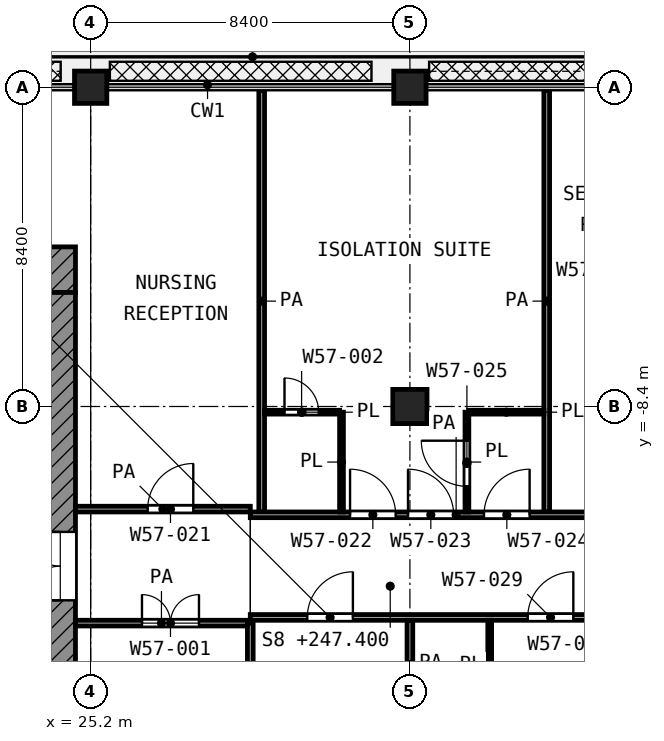
"""IFC4 building model, lengths in metres.
Left out: names, types, materials, properties, quantities, classifications, styles, units other than length and angle.
Written with IfcOpenShell. Run it as: python <this file> out.ifc"""

import sys

from ifc_helpers import new_model, si_unit, direction, frame, frame_2d, origin, origin_2d, place, context, subcontext, project, spatial, rectangle, extrude, element, fill, save


model = new_model("IFC4")
c1 = context("Model", 3, precision=1e-05, world=origin(), true_north=direction((0.0, 1.0)))
c2 = subcontext(c1, "Body", "Model", "MODEL_VIEW")
j1 = project(units=[si_unit("LENGTHUNIT", "METRE"), si_unit("PLANEANGLEUNIT", "RADIAN")], contexts=[c1])
p1 = place(None, origin())
s1 = spatial("IfcSite", under=j1, at=p1, CompositionType="ELEMENT")
p2 = place(p1, origin())
s2 = spatial("IfcBuilding", under=s1, at=p2, CompositionType="ELEMENT")
p3 = place(p2, frame((0.0, 0.0, 247.4)))
s3 = spatial("IfcBuildingStorey", under=s2, at=p3, CompositionType="ELEMENT", Elevation=247.4)
for number, where, z_axis, x_axis in (
    (1, (25.2, 0.0, 0.0), (0.0, 0.0, 1.0), (1.0, 0.0, 0.0)),
    (2, (33.6, 0.0, 0.0), (0.0, 0.0, 1.0), (1.0, 0.0, 0.0)),
):
    element("IfcColumn", number, at=place(p3, frame(where, z_axis=z_axis, x_axis=x_axis)), inside=s3, PredefinedType="COLUMN", context=c2, shape_type="SweptSolid", body=[
        extrude(rectangle(XDim=0.85, YDim=0.85, at=origin_2d()), origin(), (0.0, 0.0, 1.0), 4.2),
    ])
p4 = place(p3, frame((33.6, -8.4, 0.0), z_axis=(0.0, 0.0, 1.0), x_axis=(1.0, 0.0, 0.0)))
e3 = element("IfcColumn", 3, at=p4, inside=s3, PredefinedType="COLUMN", context=c2, shape_type="SweptSolid", body=[
    extrude(rectangle(XDim=0.9, YDim=0.9, at=origin_2d()), origin(), (0.0, 0.0, 1.0), 4.2),
])
p5 = place(p3, frame((4.2, -4.8, 0.0), z_axis=(0.0, 0.0, 1.0), x_axis=(1.0, 0.0, 0.0)))
e4 = element("IfcWall", 4, at=p5, inside=s3, PredefinedType="SHEAR", context=c2, shape_type="SweptSolid", body=[
    extrude(rectangle(XDim=20.6, YDim=1.2, at=frame_2d((10.3, 0.0))), origin(), (0.0, 0.0, 1.0), 3.6),
])
p6 = place(p5, frame((1.95, 0.0, 0.0)))
e5 = element("IfcOpeningElement", 5, at=p6, cuts=e4, PredefinedType="OPENING", context=c2, shape_type="SweptSolid", body=[
    extrude(rectangle(XDim=1.1, YDim=2.1, at=frame_2d((0.55, 1.05))), frame((0.0, 0.61, 0.0), z_axis=(0.0, -1.0, 0.0), x_axis=(1.0, 0.0, 0.0)), (0.0, 0.0, 1.0), 1.22),
])
p7 = place(p5, frame((17.95, 0.0, 0.0)))
e6 = element("IfcOpeningElement", 6, at=p7, cuts=e4, PredefinedType="OPENING", context=c2, shape_type="SweptSolid", body=[
    extrude(rectangle(XDim=1.1, YDim=2.1, at=frame_2d((0.55, 1.05))), frame((0.0, 0.61, 0.0), z_axis=(0.0, -1.0, 0.0), x_axis=(1.0, 0.0, 0.0)), (0.0, 0.0, 1.0), 1.22),
])
p8 = place(p3, frame((24.4, -24.0, 0.0), z_axis=(0.0, 0.0, 1.0), x_axis=(0.0, 1.0, 0.0)))
e7 = element("IfcWall", 7, at=p8, inside=s3, PredefinedType="SHEAR", context=c2, shape_type="SweptSolid", body=[
    extrude(rectangle(XDim=18.6, YDim=0.8, at=frame_2d((9.3, 0.0))), origin(), (0.0, 0.0, 1.0), 3.6),
])
p9 = place(p8, frame((10.5, 0.0, 0.0)))
e8 = element("IfcOpeningElement", 8, at=p9, cuts=e7, PredefinedType="OPENING", context=c2, shape_type="SweptSolid", body=[
    extrude(rectangle(XDim=1.8, YDim=2.1, at=frame_2d((0.9, 1.05))), frame((0.0, 0.41, 0.0), z_axis=(0.0, -1.0, 0.0), x_axis=(1.0, 0.0, 0.0)), (0.0, 0.0, 1.0), 0.82),
])
p10 = place(p3, frame((29.775, -8.55, 0.0), z_axis=(0.0, 0.0, 1.0), x_axis=(1.0, 0.0, 0.0)))
e9 = element("IfcWall", 9, at=p10, inside=s3, PredefinedType="PARTITIONING", context=c2, shape_type="SweptSolid", body=[
    extrude(rectangle(XDim=1.975, YDim=0.1, at=frame_2d((0.988, 0.0))), origin(), (0.0, 0.0, 1.0), 3.6),
])
p11 = place(p10, frame((0.525, 0.0, 0.0)))
e10 = element("IfcOpeningElement", 10, at=p11, cuts=e9, PredefinedType="OPENING", context=c2, shape_type="SweptSolid", body=[
    extrude(rectangle(XDim=0.9, YDim=2.1, at=frame_2d((0.45, 1.05))), frame((0.0, 0.06, 0.0), z_axis=(0.0, -1.0, 0.0), x_axis=(1.0, 0.0, 0.0)), (0.0, 0.0, 1.0), 0.12),
])
p12 = place(p3, frame((35.15, -8.55, 0.0), z_axis=(0.0, 0.0, 1.0), x_axis=(1.0, 0.0, 0.0)))
e11 = element("IfcWall", 11, at=p12, inside=s3, PredefinedType="PARTITIONING", context=c2, shape_type="SweptSolid", body=[
    extrude(rectangle(XDim=1.975, YDim=0.1, at=frame_2d((0.988, 0.0))), origin(), (0.0, 0.0, 1.0), 3.6),
])
p13 = place(p3, frame((31.8, -11.175, 0.0), z_axis=(0.0, 0.0, 1.0), x_axis=(0.0, 1.0, 0.0)))
e12 = element("IfcWall", 12, at=p13, inside=s3, PredefinedType="PARTITIONING", context=c2, shape_type="SweptSolid", body=[
    extrude(rectangle(XDim=2.625, YDim=0.1, at=frame_2d((1.312, 0.0))), origin(), (0.0, 0.0, 1.0), 3.6),
])
p14 = place(p3, frame((35.1, -11.175, 0.0), z_axis=(0.0, 0.0, 1.0), x_axis=(0.0, 1.0, 0.0)))
e13 = element("IfcWall", 13, at=p14, inside=s3, PredefinedType="PARTITIONING", context=c2, shape_type="SweptSolid", body=[
    extrude(rectangle(XDim=2.625, YDim=0.1, at=frame_2d((1.312, 0.0))), origin(), (0.0, 0.0, 1.0), 3.6),
])
p15 = place(p14, frame((0.675, 0.0, 0.0)))
e14 = element("IfcOpeningElement", 14, at=p15, cuts=e13, PredefinedType="OPENING", context=c2, shape_type="SweptSolid", body=[
    extrude(rectangle(XDim=1.2, YDim=2.1, at=frame_2d((0.6, 1.05))), frame((0.0, 0.06, 0.0), z_axis=(0.0, -1.0, 0.0), x_axis=(1.0, 0.0, 0.0)), (0.0, 0.0, 1.0), 0.12),
])
p16 = place(p3, frame((35.7, -16.65, 0.0), z_axis=(0.0, 0.0, 1.0), x_axis=(0.0, 1.0, 0.0)))
e15 = element("IfcWall", 15, at=p16, inside=s3, PredefinedType="PARTITIONING", context=c2, shape_type="SweptSolid", body=[
    extrude(rectangle(XDim=2.625, YDim=0.1, at=frame_2d((1.312, 0.0))), origin(), (0.0, 0.0, 1.0), 3.6),
])
p17 = place(p3, frame((24.8, -14.1, 0.0), z_axis=(0.0, 0.0, 1.0), x_axis=(1.0, 0.0, 0.0)))
e16 = element("IfcWall", 16, at=p17, inside=s3, PredefinedType="PARTITIONING", context=c2, shape_type="SweptSolid", body=[
    extrude(rectangle(XDim=4.525, YDim=0.15, at=frame_2d((2.262, 0.0))), origin(), (0.0, 0.0, 1.0), 3.6),
])
p18 = place(p17, frame((1.75, 0.0, 0.0)))
e17 = element("IfcOpeningElement", 17, at=p18, cuts=e16, PredefinedType="OPENING", context=c2, shape_type="SweptSolid", body=[
    extrude(rectangle(XDim=1.5, YDim=2.1, at=frame_2d((0.75, 1.05))), frame((0.0, 0.085, 0.0), z_axis=(0.0, -1.0, 0.0), x_axis=(1.0, 0.0, 0.0)), (0.0, 0.0, 1.0), 0.17),
])
p19 = place(p3, frame((29.4, -13.95, 0.0), z_axis=(0.0, 0.0, 1.0), x_axis=(1.0, 0.0, 0.0)))
e18 = element("IfcWall", 18, at=p19, inside=s3, PredefinedType="PARTITIONING", context=c2, shape_type="SweptSolid", body=[
    extrude(rectangle(XDim=33.52, YDim=0.15, at=frame_2d((16.76, 0.0))), origin(), (0.0, 0.0, 1.0), 2.7),
])
p20 = place(p19, frame((1.5, 0.0, 0.0)))
e19 = element("IfcOpeningElement", 19, at=p20, cuts=e18, PredefinedType="OPENING", context=c2, shape_type="SweptSolid", body=[
    extrude(rectangle(XDim=1.2, YDim=2.1, at=frame_2d((0.6, 1.05))), frame((0.0, 0.085, 0.0), z_axis=(0.0, -1.0, 0.0), x_axis=(1.0, 0.0, 0.0)), (0.0, 0.0, 1.0), 0.17),
])
p21 = place(p19, frame((8.85, 0.0, 0.0)))
e20 = element("IfcOpeningElement", 20, at=p21, cuts=e18, PredefinedType="OPENING", context=c2, shape_type="SweptSolid", body=[
    extrude(rectangle(XDim=1.2, YDim=2.1, at=frame_2d((0.6, 1.05))), frame((0.0, 0.085, 0.0), z_axis=(0.0, -1.0, 0.0), x_axis=(1.0, 0.0, 0.0)), (0.0, 0.0, 1.0), 0.17),
])
p22 = place(p19, frame((7.3, 0.0, 0.0)))
e21 = element("IfcOpeningElement", 21, at=p22, cuts=e18, PredefinedType="OPENING", context=c2, shape_type="SweptSolid", body=[
    extrude(rectangle(XDim=1.2, YDim=2.1, at=frame_2d((0.6, 1.05))), frame((0.0, 0.085, 0.0), z_axis=(0.0, -1.0, 0.0), x_axis=(1.0, 0.0, 0.0)), (0.0, 0.0, 1.0), 0.17),
])
p23 = place(p19, frame((10.95, 0.0, 0.0)))
e22 = element("IfcOpeningElement", 22, at=p23, cuts=e18, PredefinedType="OPENING", context=c2, shape_type="SweptSolid", body=[
    extrude(rectangle(XDim=1.2, YDim=2.1, at=frame_2d((0.6, 1.05))), frame((0.0, 0.085, 0.0), z_axis=(0.0, -1.0, 0.0), x_axis=(1.0, 0.0, 0.0)), (0.0, 0.0, 1.0), 0.17),
])
p24 = place(p19, frame((13.8, 0.0, 0.0)))
e23 = element("IfcOpeningElement", 23, at=p24, cuts=e18, PredefinedType="OPENING", context=c2, shape_type="SweptSolid", body=[
    extrude(rectangle(XDim=1.2, YDim=2.1, at=frame_2d((0.6, 1.05))), frame((0.0, 0.085, 0.0), z_axis=(0.0, -1.0, 0.0), x_axis=(1.0, 0.0, 0.0)), (0.0, 0.0, 1.0), 0.17),
])
p25 = place(p19, frame((19.7, 0.0, 0.0)))
e24 = element("IfcOpeningElement", 24, at=p25, cuts=e18, PredefinedType="OPENING", context=c2, shape_type="SweptSolid", body=[
    extrude(rectangle(XDim=1.1, YDim=2.1, at=frame_2d((0.55, 1.05))), frame((0.0, 0.085, 0.0), z_axis=(0.0, -1.0, 0.0), x_axis=(1.0, 0.0, 0.0)), (0.0, 0.0, 1.0), 0.17),
])
p26 = place(p19, frame((25.65, 0.0, 0.0)))
e25 = element("IfcOpeningElement", 25, at=p26, cuts=e18, PredefinedType="OPENING", context=c2, shape_type="SweptSolid", body=[
    extrude(rectangle(XDim=1.2, YDim=2.1, at=frame_2d((0.6, 1.05))), frame((0.0, 0.085, 0.0), z_axis=(0.0, -1.0, 0.0), x_axis=(1.0, 0.0, 0.0)), (0.0, 0.0, 1.0), 0.17),
])
p27 = place(p19, frame((24.1, 0.0, 0.0)))
e26 = element("IfcOpeningElement", 26, at=p27, cuts=e18, PredefinedType="OPENING", context=c2, shape_type="SweptSolid", body=[
    extrude(rectangle(XDim=1.2, YDim=2.1, at=frame_2d((0.6, 1.05))), frame((0.0, 0.085, 0.0), z_axis=(0.0, -1.0, 0.0), x_axis=(1.0, 0.0, 0.0)), (0.0, 0.0, 1.0), 0.17),
])
p28 = place(p19, frame((27.75, 0.0, 0.0)))
e27 = element("IfcOpeningElement", 27, at=p28, cuts=e18, PredefinedType="OPENING", context=c2, shape_type="SweptSolid", body=[
    extrude(rectangle(XDim=1.2, YDim=2.1, at=frame_2d((0.6, 1.05))), frame((0.0, 0.085, 0.0), z_axis=(0.0, -1.0, 0.0), x_axis=(1.0, 0.0, 0.0)), (0.0, 0.0, 1.0), 0.17),
])
p29 = place(p19, frame((31.0, 0.0, 0.0)))
e28 = element("IfcOpeningElement", 28, at=p29, cuts=e18, PredefinedType="OPENING", context=c2, shape_type="SweptSolid", body=[
    extrude(rectangle(XDim=1.0, YDim=2.1, at=frame_2d((0.5, 1.05))), frame((0.0, 0.085, 0.0), z_axis=(0.0, -1.0, 0.0), x_axis=(1.0, 0.0, 0.0)), (0.0, 0.0, 1.0), 0.17),
])
p30 = place(p3, frame((29.4, -11.25, 0.0), z_axis=(0.0, 0.0, 1.0), x_axis=(1.0, 0.0, 0.0)))
e29 = element("IfcWall", 29, at=p30, inside=s3, PredefinedType="PARTITIONING", context=c2, shape_type="SweptSolid", body=[
    extrude(rectangle(XDim=10.832, YDim=0.15, at=frame_2d((5.416, 0.0))), origin(), (0.0, 0.0, 1.0), 3.6),
])
p31 = place(p30, frame((2.625, 0.0, 0.0)))
e30 = element("IfcOpeningElement", 30, at=p31, cuts=e29, PredefinedType="OPENING", context=c2, shape_type="SweptSolid", body=[
    extrude(rectangle(XDim=1.2, YDim=2.1, at=frame_2d((0.6, 1.05))), frame((0.0, 0.085, 0.0), z_axis=(0.0, -1.0, 0.0), x_axis=(1.0, 0.0, 0.0)), (0.0, 0.0, 1.0), 0.17),
])
p32 = place(p30, frame((4.15, 0.0, 0.0)))
e31 = element("IfcOpeningElement", 31, at=p32, cuts=e29, PredefinedType="OPENING", context=c2, shape_type="SweptSolid", body=[
    extrude(rectangle(XDim=1.2, YDim=2.1, at=frame_2d((0.6, 1.05))), frame((0.0, 0.085, 0.0), z_axis=(0.0, -1.0, 0.0), x_axis=(1.0, 0.0, 0.0)), (0.0, 0.0, 1.0), 0.17),
])
p33 = place(p30, frame((6.15, 0.0, 0.0)))
e32 = element("IfcOpeningElement", 32, at=p33, cuts=e29, PredefinedType="OPENING", context=c2, shape_type="SweptSolid", body=[
    extrude(rectangle(XDim=1.2, YDim=2.1, at=frame_2d((0.6, 1.05))), frame((0.0, 0.085, 0.0), z_axis=(0.0, -1.0, 0.0), x_axis=(1.0, 0.0, 0.0)), (0.0, 0.0, 1.0), 0.17),
])
p34 = place(p3, frame((24.8, -11.1, 0.0), z_axis=(0.0, 0.0, 1.0), x_axis=(1.0, 0.0, 0.0)))
e33 = element("IfcWall", 33, at=p34, inside=s3, PredefinedType="PARTITIONING", context=c2, shape_type="SweptSolid", body=[
    extrude(rectangle(XDim=4.6, YDim=0.15, at=frame_2d((2.3, 0.0))), origin(), (0.0, 0.0, 1.0), 3.6),
])
p35 = place(p34, frame((1.9, 0.0, 0.0)))
e34 = element("IfcOpeningElement", 34, at=p35, cuts=e33, PredefinedType="OPENING", context=c2, shape_type="SweptSolid", body=[
    extrude(rectangle(XDim=1.2, YDim=2.1, at=frame_2d((0.6, 1.05))), frame((0.0, 0.085, 0.0), z_axis=(0.0, -1.0, 0.0), x_axis=(1.0, 0.0, 0.0)), (0.0, 0.0, 1.0), 0.17),
])
p36 = place(p3, frame((29.4, -25.2, 0.0), z_axis=(0.0, 0.0, 1.0), x_axis=(0.0, 1.0, 0.0)))
e35 = element("IfcWall", 35, at=p36, inside=s3, PredefinedType="PARTITIONING", context=c2, shape_type="SweptSolid", body=[
    extrude(rectangle(XDim=11.1, YDim=0.15, at=frame_2d((5.55, 0.0))), origin(), (0.0, 0.0, 1.0), 3.6),
])
p37 = place(p3, frame((29.7, -11.175, 0.0), z_axis=(0.0, 0.0, 1.0), x_axis=(0.0, 1.0, 0.0)))
e36 = element("IfcWall", 36, at=p37, inside=s3, PredefinedType="PARTITIONING", context=c2, shape_type="SweptSolid", body=[
    extrude(rectangle(XDim=11.095, YDim=0.15, at=frame_2d((5.547, 0.0))), origin(), (0.0, 0.0, 1.0), 3.6),
])
p38 = place(p3, frame((33.6, -16.348, 0.0), z_axis=(0.0, 0.0, 1.0), x_axis=(0.0, 1.0, 0.0)))
e37 = element("IfcWall", 37, at=p38, inside=s3, PredefinedType="PARTITIONING", context=c2, shape_type="SweptSolid", body=[
    extrude(rectangle(XDim=2.323, YDim=0.15, at=frame_2d((1.162, 0.0))), origin(), (0.0, 0.0, 1.0), 3.6),
])
p39 = place(p3, frame((37.2, -11.175, 0.0), z_axis=(0.0, 0.0, 1.0), x_axis=(0.0, 1.0, 0.0)))
e38 = element("IfcWall", 38, at=p39, inside=s3, PredefinedType="PARTITIONING", context=c2, shape_type="SweptSolid", body=[
    extrude(rectangle(XDim=11.095, YDim=0.15, at=frame_2d((5.547, 0.0))), origin(), (0.0, 0.0, 1.0), 3.6),
])
p40 = place(p9, origin())
e39 = element("IfcDoor", 39, at=p40, inside=s3, OperationType="DOUBLE_DOOR_SINGLE_SWING", PredefinedType="DOOR", context=c2, shape_type="SweptSolid", body=[
    extrude(rectangle(XDim=1.8, YDim=2.1, at=frame_2d((0.9, 1.05))), frame((0.0, 0.025, 0.0), z_axis=(0.0, -1.0, 0.0), x_axis=(1.0, 0.0, 0.0)), (0.0, 0.0, 1.0), 0.05),
])
fill(e8, e39)
p41 = place(p18, origin())
e40 = element("IfcDoor", 40, at=p41, inside=s3, OperationType="DOUBLE_DOOR_SINGLE_SWING", PredefinedType="DOOR", context=c2, shape_type="SweptSolid", body=[
    extrude(rectangle(XDim=1.5, YDim=2.1, at=frame_2d((0.75, 1.05))), frame((0.0, 0.025, 0.0), z_axis=(0.0, -1.0, 0.0), x_axis=(1.0, 0.0, 0.0)), (0.0, 0.0, 1.0), 0.05),
])
fill(e17, e40)
p42 = place(p35, origin())
e41 = element("IfcDoor", 41, at=p42, inside=s3, OperationType="SINGLE_SWING_RIGHT", PredefinedType="DOOR", context=c2, shape_type="SweptSolid", body=[
    extrude(rectangle(XDim=1.2, YDim=2.1, at=frame_2d((0.6, 1.05))), frame((0.0, 0.025, 0.0), z_axis=(0.0, -1.0, 0.0), x_axis=(1.0, 0.0, 0.0)), (0.0, 0.0, 1.0), 0.05),
])
fill(e34, e41)
p43 = place(p31, origin())
e42 = element("IfcDoor", 42, at=p43, inside=s3, OperationType="SINGLE_SWING_LEFT", PredefinedType="DOOR", context=c2, shape_type="SweptSolid", body=[
    extrude(rectangle(XDim=1.2, YDim=2.1, at=frame_2d((0.6, 1.05))), frame((0.0, 0.025, 0.0), z_axis=(0.0, -1.0, 0.0), x_axis=(1.0, 0.0, 0.0)), (0.0, 0.0, 1.0), 0.05),
])
fill(e30, e42)
p44 = place(p32, origin())
e43 = element("IfcDoor", 43, at=p44, inside=s3, OperationType="SINGLE_SWING_LEFT", PredefinedType="DOOR", context=c2, shape_type="SweptSolid", body=[
    extrude(rectangle(XDim=1.2, YDim=2.1, at=frame_2d((0.6, 1.05))), frame((0.0, 0.025, 0.0), z_axis=(0.0, -1.0, 0.0), x_axis=(1.0, 0.0, 0.0)), (0.0, 0.0, 1.0), 0.05),
])
fill(e31, e43)
p45 = place(p33, origin())
e44 = element("IfcDoor", 44, at=p45, inside=s3, OperationType="SINGLE_SWING_RIGHT", PredefinedType="DOOR", context=c2, shape_type="SweptSolid", body=[
    extrude(rectangle(XDim=1.2, YDim=2.1, at=frame_2d((0.6, 1.05))), frame((0.0, 0.025, 0.0), z_axis=(0.0, -1.0, 0.0), x_axis=(1.0, 0.0, 0.0)), (0.0, 0.0, 1.0), 0.05),
])
fill(e32, e44)
p46 = place(p15, origin())
e45 = element("IfcDoor", 45, at=p46, inside=s3, OperationType="SINGLE_SWING_RIGHT", PredefinedType="DOOR", context=c2, shape_type="SweptSolid", body=[
    extrude(rectangle(XDim=1.2, YDim=2.1, at=frame_2d((0.6, 1.05))), frame((0.0, 0.025, 0.0), z_axis=(0.0, -1.0, 0.0), x_axis=(1.0, 0.0, 0.0)), (0.0, 0.0, 1.0), 0.05),
])
fill(e14, e45)
p47 = place(p11, origin())
e46 = element("IfcDoor", 46, at=p47, inside=s3, OperationType="SINGLE_SWING_LEFT", PredefinedType="DOOR", context=c2, shape_type="SweptSolid", body=[
    extrude(rectangle(XDim=0.9, YDim=2.1, at=frame_2d((0.45, 1.05))), frame((0.0, 0.025, 0.0), z_axis=(0.0, -1.0, 0.0), x_axis=(1.0, 0.0, 0.0)), (0.0, 0.0, 1.0), 0.05),
])
fill(e10, e46)
p48 = place(p20, origin())
e47 = element("IfcDoor", 47, at=p48, inside=s3, OperationType="SINGLE_SWING_RIGHT", PredefinedType="DOOR", context=c2, shape_type="SweptSolid", body=[
    extrude(rectangle(XDim=1.2, YDim=2.1, at=frame_2d((0.6, 1.05))), frame((0.0, 0.025, 0.0), z_axis=(0.0, -1.0, 0.0), x_axis=(1.0, 0.0, 0.0)), (0.0, 0.0, 1.0), 0.05),
])
fill(e19, e47)
p49 = place(p22, origin())
e48 = element("IfcDoor", 48, at=p49, inside=s3, OperationType="SINGLE_SWING_RIGHT", PredefinedType="DOOR", context=c2, shape_type="SweptSolid", body=[
    extrude(rectangle(XDim=1.2, YDim=2.1, at=frame_2d((0.6, 1.05))), frame((0.0, 0.025, 0.0), z_axis=(0.0, -1.0, 0.0), x_axis=(1.0, 0.0, 0.0)), (0.0, 0.0, 1.0), 0.05),
])
fill(e21, e48)
save(model, sys.argv[1])
